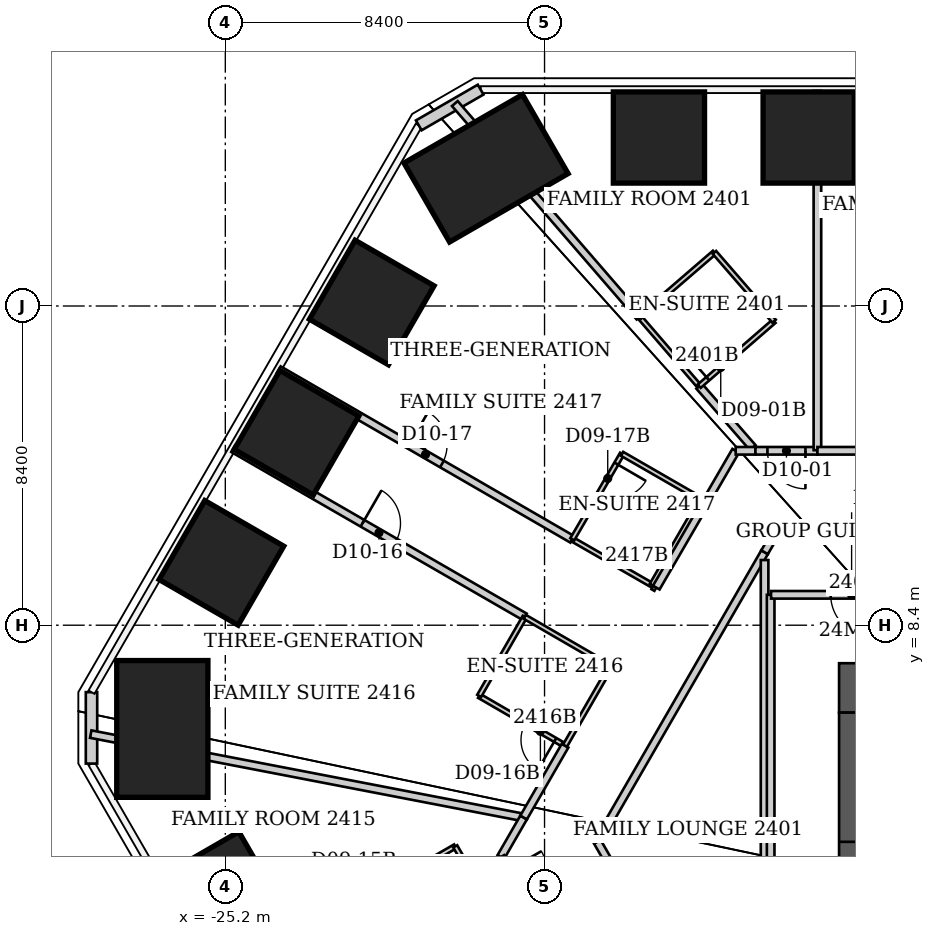
"""IFC4 building model, lengths in metres.
Left out: names, types, materials, properties, quantities, classifications, styles, units other than length and angle.
Written with IfcOpenShell. Run it as: python <this file> out.ifc"""

import sys

from ifc_helpers import new_model, si_unit, direction, frame, frame_2d, origin, origin_2d, place, context, subcontext, project, spatial, rectangle, extrude, element, fill, save


model = new_model("IFC4")
c1 = context("Model", 3, precision=1e-05, world=origin(), true_north=direction((0.0, 1.0)))
c2 = subcontext(c1, "Body", "Model", "MODEL_VIEW")
j1 = project(units=[si_unit("LENGTHUNIT", "METRE"), si_unit("PLANEANGLEUNIT", "RADIAN")], contexts=[c1])
p1 = place(None, origin())
s1 = spatial("IfcSite", under=j1, at=p1, CompositionType="ELEMENT")
p2 = place(p1, origin())
s2 = spatial("IfcBuilding", under=s1, at=p2, CompositionType="ELEMENT")
p3 = place(p2, frame((0.0, 0.0, 100.6)))
s3 = spatial("IfcBuildingStorey", under=s2, at=p3, CompositionType="ELEMENT", Elevation=100.6)
for number, where, z_axis, x_axis in (
    (1, (-13.79, 21.234, 0.0), (0.0, 0.0, 1.0), (0.0, 1.0, 0.0)),
    (2, (-9.85, 21.234, 0.0), (0.0, 0.0, 1.0), (0.0, 1.0, 0.0)),
    (3, (-25.284, 1.325, 0.0), (0.0, 0.0, 1.0), (-0.866, -0.5, 0.0)),
):
    element("IfcColumn", number, at=place(p3, frame(where, z_axis=z_axis, x_axis=x_axis)), inside=s3, PredefinedType="COLUMN", context=c2, shape_type="SweptSolid", body=[
        extrude(rectangle(XDim=2.4, YDim=2.4, at=origin_2d()), origin(), (0.0, 0.0, 1.0), 3.8),
    ])
p4 = place(p3, frame((-26.857, 5.67, 0.0), z_axis=(0.0, 0.0, 1.0), x_axis=(-1.0, 0.0, 0.0)))
e4 = element("IfcColumn", 4, at=p4, inside=s3, PredefinedType="COLUMN", context=c2, shape_type="SweptSolid", body=[
    extrude(rectangle(XDim=2.4, YDim=3.6, at=origin_2d()), origin(), (0.0, 0.0, 1.0), 3.8),
])
for number, where, z_axis, x_axis in (
    (5, (-25.302, 10.041, 0.0), (0.0, 0.0, 1.0), (-0.866, 0.5, 0.0)),
    (6, (-23.324, 13.466, 0.0), (0.0, 0.0, 1.0), (-0.866, 0.5, 0.0)),
    (7, (-21.346, 16.891, 0.0), (0.0, 0.0, 1.0), (-0.866, 0.5, 0.0)),
):
    element("IfcColumn", number, at=place(p3, frame(where, z_axis=z_axis, x_axis=x_axis)), inside=s3, PredefinedType="COLUMN", context=c2, shape_type="SweptSolid", body=[
        extrude(rectangle(XDim=2.4, YDim=2.4, at=origin_2d()), origin(), (0.0, 0.0, 1.0), 3.8),
    ])
p5 = place(p3, frame((-18.339, 20.424, 0.0), z_axis=(0.0, 0.0, 1.0), x_axis=(-0.5, 0.866025403784, 0.0)))
e8 = element("IfcColumn", 8, at=p5, inside=s3, PredefinedType="COLUMN", context=c2, shape_type="SweptSolid", body=[
    extrude(rectangle(XDim=2.4, YDim=3.6, at=origin_2d()), origin(), (0.0, 0.0, 1.0), 3.8),
])
p6 = place(p3, frame((-9.05, 6.75, 0.0), z_axis=(0.0, 0.0, 1.0), x_axis=(1.0, 0.0, 0.0)))
e9 = element("IfcWall", 9, at=p6, inside=s3, PredefinedType="SHEAR", context=c2, shape_type="SweptSolid", body=[
    extrude(rectangle(XDim=18.1, YDim=1.3, at=frame_2d((9.05, 0.0))), origin(), (0.0, 0.0, 1.0), 3.8),
])
p7 = place(p3, frame((-8.4, -9.2, 0.0), z_axis=(0.0, 0.0, 1.0), x_axis=(0.0, 1.0, 0.0)))
e10 = element("IfcWall", 10, at=p7, inside=s3, PredefinedType="SHEAR", context=c2, shape_type="SweptSolid", body=[
    extrude(rectangle(XDim=15.3, YDim=1.3, at=frame_2d((7.65, 0.0))), origin(), (0.0, 0.0, 1.0), 3.8),
])
p8 = place(p7, frame((10.7, 0.0, 0.0)))
e11 = element("IfcOpeningElement", 11, at=p8, cuts=e10, PredefinedType="OPENING", context=c2, shape_type="SweptSolid", body=[
    extrude(rectangle(XDim=1.2, YDim=2.2, at=frame_2d((0.6, 1.1))), frame((0.0, 0.65, 0.0), z_axis=(0.0, -1.0, 0.0), x_axis=(1.0, 0.0, 0.0)), (0.0, 0.0, 1.0), 1.3),
])
p9 = place(p3, frame((-28.721, 4.759, 0.0), z_axis=(0.0, 0.0, 1.0), x_axis=(0.0, 1.0, 0.0)))
e12 = element("IfcWall", 12, at=p9, inside=s3, PredefinedType="SOLIDWALL", context=c2, shape_type="SweptSolid", body=[
    extrude(rectangle(XDim=1.88, YDim=0.3, at=frame_2d((0.94, 0.0))), origin(), (0.0, 0.0, 1.0), 3.64),
])
p10 = place(p3, frame((-20.11, 21.554, 0.0), z_axis=(0.0, 0.0, 1.0), x_axis=(0.865988793993, 0.500063404658, 0.0)))
e13 = element("IfcWall", 13, at=p10, inside=s3, PredefinedType="SOLIDWALL", context=c2, shape_type="SweptSolid", body=[
    extrude(rectangle(XDim=1.88, YDim=0.3, at=frame_2d((0.94, 0.0))), origin(), (0.0, 0.0, 1.0), 3.64),
])
p11 = place(p3, frame((-28.74, 5.534, 0.0), z_axis=(0.0, 0.0, 1.0), x_axis=(0.981941558077, -0.189184503913, 0.0)))
e14 = element("IfcWall", 14, at=p11, inside=s3, PredefinedType="PARTITIONING", context=c2, shape_type="SweptSolid", body=[
    extrude(rectangle(XDim=11.55, YDim=0.2, at=frame_2d((5.775, 0.0))), origin(), (0.0, 0.0, 1.0), 3.64),
])
p12 = place(p3, frame((-24.994, 13.045, 0.0), z_axis=(0.0, 0.0, 1.0), x_axis=(0.866303025974, -0.499518835669, 0.0)))
e15 = element("IfcWall", 15, at=p12, inside=s3, PredefinedType="PARTITIONING", context=c2, shape_type="SweptSolid", body=[
    extrude(rectangle(XDim=8.858, YDim=0.2, at=frame_2d((4.429, 0.0))), origin(), (0.0, 0.0, 1.0), 3.64),
])
p13 = place(p12, frame((3.929, 0.0, 0.0)))
e16 = element("IfcOpeningElement", 16, at=p13, cuts=e15, PredefinedType="OPENING", context=c2, shape_type="SweptSolid", body=[
    extrude(rectangle(XDim=1.0, YDim=2.13, at=frame_2d((0.5, 1.065))), frame((0.0, 0.1, 0.0), z_axis=(0.0, -1.0, 0.0), x_axis=(1.0, 0.0, 0.0)), (0.0, 0.0, 1.0), 0.2),
])
p14 = place(p3, frame((-23.794, 15.125, 0.0), z_axis=(0.0, 0.0, 1.0), x_axis=(0.865748355596, -0.500479554809, 0.0)))
e17 = element("IfcWall", 17, at=p14, inside=s3, PredefinedType="PARTITIONING", context=c2, shape_type="SweptSolid", body=[
    extrude(rectangle(XDim=8.922, YDim=0.2, at=frame_2d((4.461, 0.0))), origin(), (0.0, 0.0, 1.0), 3.64),
])
p15 = place(p14, frame((3.961, 0.0, 0.0)))
e18 = element("IfcOpeningElement", 18, at=p15, cuts=e17, PredefinedType="OPENING", context=c2, shape_type="SweptSolid", body=[
    extrude(rectangle(XDim=1.0, YDim=2.13, at=frame_2d((0.5, 1.065))), frame((0.0, 0.1, 0.0), z_axis=(0.0, -1.0, 0.0), x_axis=(1.0, 0.0, 0.0)), (0.0, 0.0, 1.0), 0.2),
])
p16 = place(p3, frame((-19.16, 22.127, 0.0), z_axis=(0.0, 0.0, 1.0), x_axis=(0.654324699903, -0.756213717871, 0.0)))
e19 = element("IfcWall", 19, at=p16, inside=s3, PredefinedType="PARTITIONING", context=c2, shape_type="SweptSolid", body=[
    extrude(rectangle(XDim=7.428, YDim=0.2, at=frame_2d((3.714, 0.0))), origin(), (0.0, 0.0, 1.0), 3.64),
])
p17 = place(p3, frame((-19.15, 2.58, 0.0), z_axis=(0.0, 0.0, 1.0), x_axis=(-0.86653430447, -0.499117520406, 0.0)))
e20 = element("IfcWall", 20, at=p17, inside=s3, PredefinedType="PARTITIONING", context=c2, shape_type="SweptSolid", body=[
    extrude(rectangle(XDim=2.504, YDim=0.12, at=frame_2d((1.252, 0.0))), origin(), (0.0, 0.0, 1.0), 3.038),
])
p18 = place(p3, frame((-18.52, 6.54, 0.0), z_axis=(0.0, 0.0, 1.0), x_axis=(0.865155281359, -0.50150407689, 0.0)))
e21 = element("IfcWall", 21, at=p18, inside=s3, PredefinedType="PARTITIONING", context=c2, shape_type="SweptSolid", body=[
    extrude(rectangle(XDim=2.612, YDim=0.12, at=frame_2d((1.306, 0.0))), origin(), (0.0, 0.0, 1.0), 3.64),
])
p19 = place(p18, frame((1.412, 0.0, 0.0)))
e22 = element("IfcOpeningElement", 22, at=p19, cuts=e21, PredefinedType="OPENING", context=c2, shape_type="SweptSolid", body=[
    extrude(rectangle(XDim=0.9, YDim=2.03, at=frame_2d((0.45, 1.015))), frame((0.0, 0.06, 0.0), z_axis=(0.0, -1.0, 0.0), x_axis=(1.0, 0.0, 0.0)), (0.0, 0.0, 1.0), 0.12),
])
p20 = place(p3, frame((-17.95, 2.3, 0.0), z_axis=(0.0, 0.0, 1.0), x_axis=(0.499616828121, 0.866246515178, 0.0)))
e23 = element("IfcWall", 23, at=p20, inside=s3, PredefinedType="PARTITIONING", context=c2, shape_type="SweptSolid", body=[
    extrude(rectangle(XDim=1.201, YDim=0.2, at=frame_2d((0.6, 0.0))), origin(), (0.0, 0.0, 1.0), 3.64),
])
p21 = place(p3, frame((-17.95, 2.3, 0.0), z_axis=(0.0, 0.0, 1.0), x_axis=(0.499667687562, -0.866217179469, 0.0)))
e24 = element("IfcWall", 24, at=p21, inside=s3, PredefinedType="PARTITIONING", context=c2, shape_type="SweptSolid", body=[
    extrude(rectangle(XDim=1.801, YDim=0.2, at=frame_2d((0.9, 0.0))), origin(), (0.0, 0.0, 1.0), 3.64),
])
p22 = place(p21, frame((0.4, 0.0, 0.0)))
e25 = element("IfcOpeningElement", 25, at=p22, cuts=e24, PredefinedType="OPENING", context=c2, shape_type="SweptSolid", body=[
    extrude(rectangle(XDim=1.0, YDim=2.13, at=frame_2d((0.5, 1.065))), frame((0.0, 0.1, 0.0), z_axis=(0.0, -1.0, 0.0), x_axis=(1.0, 0.0, 0.0)), (0.0, 0.0, 1.0), 0.2),
])
p23 = place(p3, frame((-17.83, 0.29, 0.0), z_axis=(0.0, 0.0, 1.0), x_axis=(-0.499338582192, 0.866406936915, 0.0)))
e26 = element("IfcWall", 26, at=p23, inside=s3, PredefinedType="PARTITIONING", context=c2, shape_type="SweptSolid", body=[
    extrude(rectangle(XDim=2.643, YDim=0.12, at=frame_2d((1.322, 0.0))), origin(), (0.0, 0.0, 1.0), 3.64),
])
p24 = place(p3, frame((-17.35, 3.34, 0.0), z_axis=(0.0, 0.0, 1.0), x_axis=(0.499641723021, 0.866232156305, 0.0)))
e27 = element("IfcWall", 27, at=p24, inside=s3, PredefinedType="PARTITIONING", context=c2, shape_type="SweptSolid", body=[
    extrude(rectangle(XDim=2.182, YDim=0.2, at=frame_2d((1.091, 0.0))), origin(), (0.0, 0.0, 1.0), 3.64),
])
p25 = place(p3, frame((-17.32, 8.62, 0.0), z_axis=(0.0, 0.0, 1.0), x_axis=(-0.499693115345, -0.866202511239, 0.0)))
e28 = element("IfcWall", 28, at=p25, inside=s3, PredefinedType="PARTITIONING", context=c2, shape_type="SweptSolid", body=[
    extrude(rectangle(XDim=2.401, YDim=0.12, at=frame_2d((1.201, 0.0))), origin(), (0.0, 0.0, 1.0), 3.64),
])
p26 = place(p3, frame((-17.32, 8.62, 0.0), z_axis=(0.0, 0.0, 1.0), x_axis=(0.865155281359, -0.50150407689, 0.0)))
e29 = element("IfcWall", 29, at=p26, inside=s3, PredefinedType="PARTITIONING", context=c2, shape_type="SweptSolid", body=[
    extrude(rectangle(XDim=2.612, YDim=0.12, at=frame_2d((1.306, 0.0))), origin(), (0.0, 0.0, 1.0), 3.64),
])
p27 = place(p3, frame((-16.261, 5.231, 0.0), z_axis=(0.0, 0.0, 1.0), x_axis=(0.500326720225, 0.865836689583, 0.0)))
e30 = element("IfcWall", 30, at=p27, inside=s3, PredefinedType="PARTITIONING", context=c2, shape_type="SweptSolid", body=[
    extrude(rectangle(XDim=2.401, YDim=0.12, at=frame_2d((1.201, 0.0))), origin(), (0.0, 0.0, 1.0), 3.64),
])
p28 = place(p3, frame((-16.07, 10.66, 0.0), z_axis=(0.0, 0.0, 1.0), x_axis=(0.866987280299, -0.498330267795, 0.0)))
e31 = element("IfcWall", 31, at=p28, inside=s3, PredefinedType="PARTITIONING", context=c2, shape_type="SweptSolid", body=[
    extrude(rectangle(XDim=2.41, YDim=0.12, at=frame_2d((1.205, 0.0))), origin(), (0.0, 0.0, 1.0), 3.64),
])
p29 = place(p3, frame((-15.41, 2.7, 0.0), z_axis=(0.0, 0.0, 1.0), x_axis=(0.500036278648, 0.866004457284, 0.0)))
e32 = element("IfcWall", 32, at=p29, inside=s3, PredefinedType="PARTITIONING", context=c2, shape_type="SweptSolid", body=[
    extrude(rectangle(XDim=8.799, YDim=0.2, at=frame_2d((4.399, 0.0))), origin(), (0.0, 0.0, 1.0), 3.64),
])
p30 = place(p3, frame((-14.76, 12.91, 0.0), z_axis=(0.0, 0.0, 1.0), x_axis=(-0.503171227198, -0.864186736834, 0.0)))
e33 = element("IfcWall", 33, at=p30, inside=s3, PredefinedType="PARTITIONING", context=c2, shape_type="SweptSolid", body=[
    extrude(rectangle(XDim=2.604, YDim=0.12, at=frame_2d((1.302, 0.0))), origin(), (0.0, 0.0, 1.0), 3.64),
])
p31 = place(p30, frame((0.3, 0.0, 0.0)))
e34 = element("IfcOpeningElement", 34, at=p31, cuts=e33, PredefinedType="OPENING", context=c2, shape_type="SweptSolid", body=[
    extrude(rectangle(XDim=0.9, YDim=2.03, at=frame_2d((0.45, 1.015))), frame((0.0, 0.06, 0.0), z_axis=(0.0, -1.0, 0.0), x_axis=(1.0, 0.0, 0.0)), (0.0, 0.0, 1.0), 0.12),
])
p32 = place(p3, frame((-14.3, 16.51, 0.0), z_axis=(0.0, 0.0, 1.0), x_axis=(0.653188728136, -0.757195143563, 0.0)))
e35 = element("IfcWall", 35, at=p32, inside=s3, PredefinedType="PARTITIONING", context=c2, shape_type="SweptSolid", body=[
    extrude(rectangle(XDim=2.404, YDim=0.12, at=frame_2d((1.202, 0.0))), origin(), (0.0, 0.0, 1.0), 3.64),
])
p33 = place(p3, frame((-13.98, 9.46, 0.0), z_axis=(0.0, 0.0, 1.0), x_axis=(0.500291685314, 0.865856933682, 0.0)))
e36 = element("IfcWall", 36, at=p33, inside=s3, PredefinedType="PARTITIONING", context=c2, shape_type="SweptSolid", body=[
    extrude(rectangle(XDim=2.599, YDim=0.12, at=frame_2d((1.299, 0.0))), origin(), (0.0, 0.0, 1.0), 3.64),
])
p34 = place(p3, frame((-13.937, 9.434, 0.0), z_axis=(0.0, 0.0, 1.0), x_axis=(0.867735735179, -0.497025848315, 0.0)))
e37 = element("IfcWall", 37, at=p34, inside=s3, PredefinedType="PARTITIONING", context=c2, shape_type="SweptSolid", body=[
    extrude(rectangle(XDim=0.089, YDim=0.2, at=frame_2d((0.044, 0.0))), origin(), (0.0, 0.0, 1.0), 3.64),
])
p35 = place(p3, frame((-12.73, 14.69, 0.0), z_axis=(0.0, 0.0, 1.0), x_axis=(0.656624063312, -0.754218031792, 0.0)))
e38 = element("IfcWall", 38, at=p35, inside=s3, PredefinedType="PARTITIONING", context=c2, shape_type="SweptSolid", body=[
    extrude(rectangle(XDim=2.144, YDim=0.2, at=frame_2d((1.072, 0.0))), origin(), (0.0, 0.0, 1.0), 3.64),
])
p36 = place(p3, frame((-12.73, 14.69, 0.0), z_axis=(0.0, 0.0, 1.0), x_axis=(0.755185511235, 0.655511131576, 0.0)))
e39 = element("IfcWall", 39, at=p36, inside=s3, PredefinedType="PARTITIONING", context=c2, shape_type="SweptSolid", body=[
    extrude(rectangle(XDim=2.609, YDim=0.12, at=frame_2d((1.304, 0.0))), origin(), (0.0, 0.0, 1.0), 3.64),
])
p37 = place(p36, frame((0.3, 0.0, 0.0)))
e40 = element("IfcOpeningElement", 40, at=p37, cuts=e39, PredefinedType="OPENING", context=c2, shape_type="SweptSolid", body=[
    extrude(rectangle(XDim=0.9, YDim=2.03, at=frame_2d((0.45, 1.015))), frame((0.0, 0.06, 0.0), z_axis=(0.0, -1.0, 0.0), x_axis=(1.0, 0.0, 0.0)), (0.0, 0.0, 1.0), 0.12),
])
p38 = place(p3, frame((-12.68, 11.71, 0.0), z_axis=(0.0, 0.0, 1.0), x_axis=(-0.866202511239, 0.499693115345, 0.0)))
e41 = element("IfcWall", 41, at=p38, inside=s3, PredefinedType="PARTITIONING", context=c2, shape_type="SweptSolid", body=[
    extrude(rectangle(XDim=2.401, YDim=0.12, at=frame_2d((1.201, 0.0))), origin(), (0.0, 0.0, 1.0), 3.64),
])
p39 = place(p3, frame((-12.33, 18.21, 0.0), z_axis=(0.0, 0.0, 1.0), x_axis=(-0.757086659925, -0.653314464377, 0.0)))
e42 = element("IfcWall", 42, at=p39, inside=s3, PredefinedType="PARTITIONING", context=c2, shape_type="SweptSolid", body=[
    extrude(rectangle(XDim=2.602, YDim=0.12, at=frame_2d((1.301, 0.0))), origin(), (0.0, 0.0, 1.0), 3.64),
])
p40 = place(p3, frame((-11.77, 12.99, 0.0), z_axis=(0.0, 0.0, 1.0), x_axis=(-0.502083167097, -0.864819341434, 0.0)))
e43 = element("IfcWall", 43, at=p40, inside=s3, PredefinedType="PARTITIONING", context=c2, shape_type="SweptSolid", body=[
    extrude(rectangle(XDim=4.163, YDim=0.2, at=frame_2d((2.082, 0.0))), origin(), (0.0, 0.0, 1.0), 3.64),
])
p41 = place(p3, frame((-11.25, 12.99, 0.0), z_axis=(0.0, 0.0, 1.0), x_axis=(-1.0, 0.0, 0.0)))
e44 = element("IfcWall", 44, at=p41, inside=s3, PredefinedType="PARTITIONING", context=c2, shape_type="SweptSolid", body=[
    extrude(rectangle(XDim=0.52, YDim=0.2, at=frame_2d((0.26, 0.0))), origin(), (0.0, 0.0, 1.0), 3.64),
])
p42 = place(p3, frame((-11.01, -4.93, 0.0), z_axis=(0.0, 0.0, 1.0), x_axis=(-0.499556067326, 0.866281556769, 0.0)))
e45 = element("IfcWall", 45, at=p42, inside=s3, PredefinedType="PARTITIONING", context=c2, shape_type="SweptSolid", body=[
    extrude(rectangle(XDim=8.808, YDim=0.2, at=frame_2d((4.404, 0.0))), origin(), (0.0, 0.0, 1.0), 3.64),
])
p43 = place(p42, frame((3.854, 0.0, 0.0)))
e46 = element("IfcOpeningElement", 46, at=p43, cuts=e45, PredefinedType="OPENING", context=c2, shape_type="SweptSolid", body=[
    extrude(rectangle(XDim=1.1, YDim=2.2, at=frame_2d((0.55, 1.1))), frame((0.0, 0.1, 0.0), z_axis=(0.0, -1.0, 0.0), x_axis=(1.0, 0.0, 0.0)), (0.0, 0.0, 1.0), 0.2),
])
p44 = place(p3, frame((-11.01, 10.115, 0.0), z_axis=(0.0, 0.0, 1.0), x_axis=(0.0, -1.0, 0.0)))
e47 = element("IfcWall", 47, at=p44, inside=s3, PredefinedType="PARTITIONING", context=c2, shape_type="SweptSolid", body=[
    extrude(rectangle(XDim=14.84, YDim=0.2, at=frame_2d((7.42, 0.0))), origin(), (0.0, 0.0, 1.0), 3.64),
])
p45 = place(p3, frame((-11.01, 10.32, 0.0), z_axis=(0.0, 0.0, 1.0), x_axis=(0.503009091795, 0.864281119527, 0.0)))
e48 = element("IfcWall", 48, at=p45, inside=s3, PredefinedType="PARTITIONING", context=c2, shape_type="SweptSolid", body=[
    extrude(rectangle(XDim=0.775, YDim=0.2, at=frame_2d((0.388, 0.0))), origin(), (0.0, 0.0, 1.0), 3.64),
])
p46 = place(p3, frame((-10.85, 9.2, 0.0), z_axis=(0.0, 0.0, 1.0), x_axis=(0.0, -1.0, 0.0)))
e49 = element("IfcWall", 49, at=p46, inside=s3, PredefinedType="PARTITIONING", context=c2, shape_type="SweptSolid", body=[
    extrude(rectangle(XDim=14.11, YDim=0.2, at=frame_2d((7.055, 0.0))), origin(), (0.0, 0.0, 1.0), 3.64),
])
p47 = place(p3, frame((-10.76, 16.4, 0.0), z_axis=(0.0, 0.0, 1.0), x_axis=(-0.655252439976, 0.755409981338, 0.0)))
e50 = element("IfcWall", 50, at=p47, inside=s3, PredefinedType="PARTITIONING", context=c2, shape_type="SweptSolid", body=[
    extrude(rectangle(XDim=2.396, YDim=0.12, at=frame_2d((1.198, 0.0))), origin(), (0.0, 0.0, 1.0), 3.64),
])
p48 = place(p3, frame((-10.62, 10.99, 0.0), z_axis=(0.0, 0.0, 1.0), x_axis=(1.0, 0.0, 0.0)))
e51 = element("IfcWall", 51, at=p48, inside=s3, PredefinedType="PARTITIONING", context=c2, shape_type="SweptSolid", body=[
    extrude(rectangle(XDim=4.02, YDim=0.2, at=frame_2d((2.01, 0.0))), origin(), (0.0, 0.0, 1.0), 3.64),
])
p49 = place(p3, frame((-9.62, 12.99, 0.0), z_axis=(0.0, 0.0, 1.0), x_axis=(-1.0, 0.0, 0.0)))
e52 = element("IfcWall", 52, at=p49, inside=s3, PredefinedType="PARTITIONING", context=c2, shape_type="SweptSolid", body=[
    extrude(rectangle(XDim=1.63, YDim=0.2, at=frame_2d((0.815, 0.0))), origin(), (0.0, 0.0, 1.0), 3.64),
])
p50 = place(p49, frame((0.315, 0.0, 0.0)))
e53 = element("IfcOpeningElement", 53, at=p50, cuts=e52, PredefinedType="OPENING", context=c2, shape_type="SweptSolid", body=[
    extrude(rectangle(XDim=1.0, YDim=2.13, at=frame_2d((0.5, 1.065))), frame((0.0, 0.1, 0.0), z_axis=(0.0, -1.0, 0.0), x_axis=(1.0, 0.0, 0.0)), (0.0, 0.0, 1.0), 0.2),
])
p51 = place(p3, frame((-9.62, 22.46, 0.0), z_axis=(0.0, 0.0, 1.0), x_axis=(0.0, -1.0, 0.0)))
e54 = element("IfcWall", 54, at=p51, inside=s3, PredefinedType="PARTITIONING", context=c2, shape_type="SweptSolid", body=[
    extrude(rectangle(XDim=9.455, YDim=0.2, at=frame_2d((4.728, 0.0))), origin(), (0.0, 0.0, 1.0), 3.64),
])
p52 = place(p3, frame((-6.6, 9.2, 0.0), z_axis=(0.0, 0.0, 1.0), x_axis=(-1.0, 0.0, 0.0)))
e55 = element("IfcWall", 55, at=p52, inside=s3, PredefinedType="PARTITIONING", context=c2, shape_type="SweptSolid", body=[
    extrude(rectangle(XDim=4.24, YDim=0.2, at=frame_2d((2.12, 0.0))), origin(), (0.0, 0.0, 1.0), 3.64),
])
p53 = place(p52, frame((1.57, 0.0, 0.0)))
e56 = element("IfcOpeningElement", 56, at=p53, cuts=e55, PredefinedType="OPENING", context=c2, shape_type="SweptSolid", body=[
    extrude(rectangle(XDim=1.1, YDim=2.2, at=frame_2d((0.55, 1.1))), frame((0.0, 0.1, 0.0), z_axis=(0.0, -1.0, 0.0), x_axis=(1.0, 0.0, 0.0)), (0.0, 0.0, 1.0), 0.2),
])
p54 = place(p3, frame((-5.7, 12.99, 0.0), z_axis=(0.0, 0.0, 1.0), x_axis=(-1.0, 0.0, 0.0)))
e57 = element("IfcWall", 57, at=p54, inside=s3, PredefinedType="PARTITIONING", context=c2, shape_type="SweptSolid", body=[
    extrude(rectangle(XDim=3.92, YDim=0.2, at=frame_2d((1.96, 0.0))), origin(), (0.0, 0.0, 1.0), 3.64),
])
p55 = place(p50, origin())
e58 = element("IfcDoor", 58, at=p55, inside=s3, OperationType="SINGLE_SWING_LEFT", PredefinedType="DOOR", context=c2, shape_type="SweptSolid", body=[
    extrude(rectangle(XDim=1.0, YDim=2.13, at=frame_2d((0.5, 1.065))), frame((0.0, 0.025, 0.0), z_axis=(0.0, -1.0, 0.0), x_axis=(1.0, 0.0, 0.0)), (0.0, 0.0, 1.0), 0.05),
])
fill(e53, e58)
p56 = place(p37, origin())
e59 = element("IfcDoor", 59, at=p56, inside=s3, OperationType="SINGLE_SWING_LEFT", PredefinedType="DOOR", context=c2, shape_type="SweptSolid", body=[
    extrude(rectangle(XDim=0.9, YDim=2.03, at=frame_2d((0.45, 1.015))), frame((0.0, 0.025, 0.0), z_axis=(0.0, -1.0, 0.0), x_axis=(1.0, 0.0, 0.0)), (0.0, 0.0, 1.0), 0.05),
])
fill(e40, e59)
p57 = place(p13, origin())
e60 = element("IfcDoor", 60, at=p57, inside=s3, OperationType="SINGLE_SWING_LEFT", PredefinedType="DOOR", context=c2, shape_type="SweptSolid", body=[
    extrude(rectangle(XDim=1.0, YDim=2.13, at=frame_2d((0.5, 1.065))), frame((0.0, 0.025, 0.0), z_axis=(0.0, -1.0, 0.0), x_axis=(1.0, 0.0, 0.0)), (0.0, 0.0, 1.0), 0.05),
])
fill(e16, e60)
p58 = place(p19, origin())
e61 = element("IfcDoor", 61, at=p58, inside=s3, OperationType="SINGLE_SWING_RIGHT", PredefinedType="DOOR", context=c2, shape_type="SweptSolid", body=[
    extrude(rectangle(XDim=0.9, YDim=2.03, at=frame_2d((0.45, 1.015))), frame((0.0, 0.025, 0.0), z_axis=(0.0, -1.0, 0.0), x_axis=(1.0, 0.0, 0.0)), (0.0, 0.0, 1.0), 0.05),
])
fill(e22, e61)
p59 = place(p15, origin())
e62 = element("IfcDoor", 62, at=p59, inside=s3, OperationType="SINGLE_SWING_LEFT", PredefinedType="DOOR", context=c2, shape_type="SweptSolid", body=[
    extrude(rectangle(XDim=1.0, YDim=2.13, at=frame_2d((0.5, 1.065))), frame((0.0, 0.025, 0.0), z_axis=(0.0, -1.0, 0.0), x_axis=(1.0, 0.0, 0.0)), (0.0, 0.0, 1.0), 0.05),
])
fill(e18, e62)
p60 = place(p31, origin())
e63 = element("IfcDoor", 63, at=p60, inside=s3, OperationType="SINGLE_SWING_LEFT", PredefinedType="DOOR", context=c2, shape_type="SweptSolid", body=[
    extrude(rectangle(XDim=0.9, YDim=2.03, at=frame_2d((0.45, 1.015))), frame((0.0, 0.025, 0.0), z_axis=(0.0, -1.0, 0.0), x_axis=(1.0, 0.0, 0.0)), (0.0, 0.0, 1.0), 0.05),
])
fill(e34, e63)
p61 = place(p53, origin())
e64 = element("IfcDoor", 64, at=p61, inside=s3, OperationType="SINGLE_SWING_LEFT", PredefinedType="DOOR", context=c2, shape_type="SweptSolid", body=[
    extrude(rectangle(XDim=1.1, YDim=2.2, at=frame_2d((0.55, 1.1))), frame((0.0, 0.025, 0.0), z_axis=(0.0, -1.0, 0.0), x_axis=(1.0, 0.0, 0.0)), (0.0, 0.0, 1.0), 0.05),
])
fill(e56, e64)
save(model, sys.argv[1])
